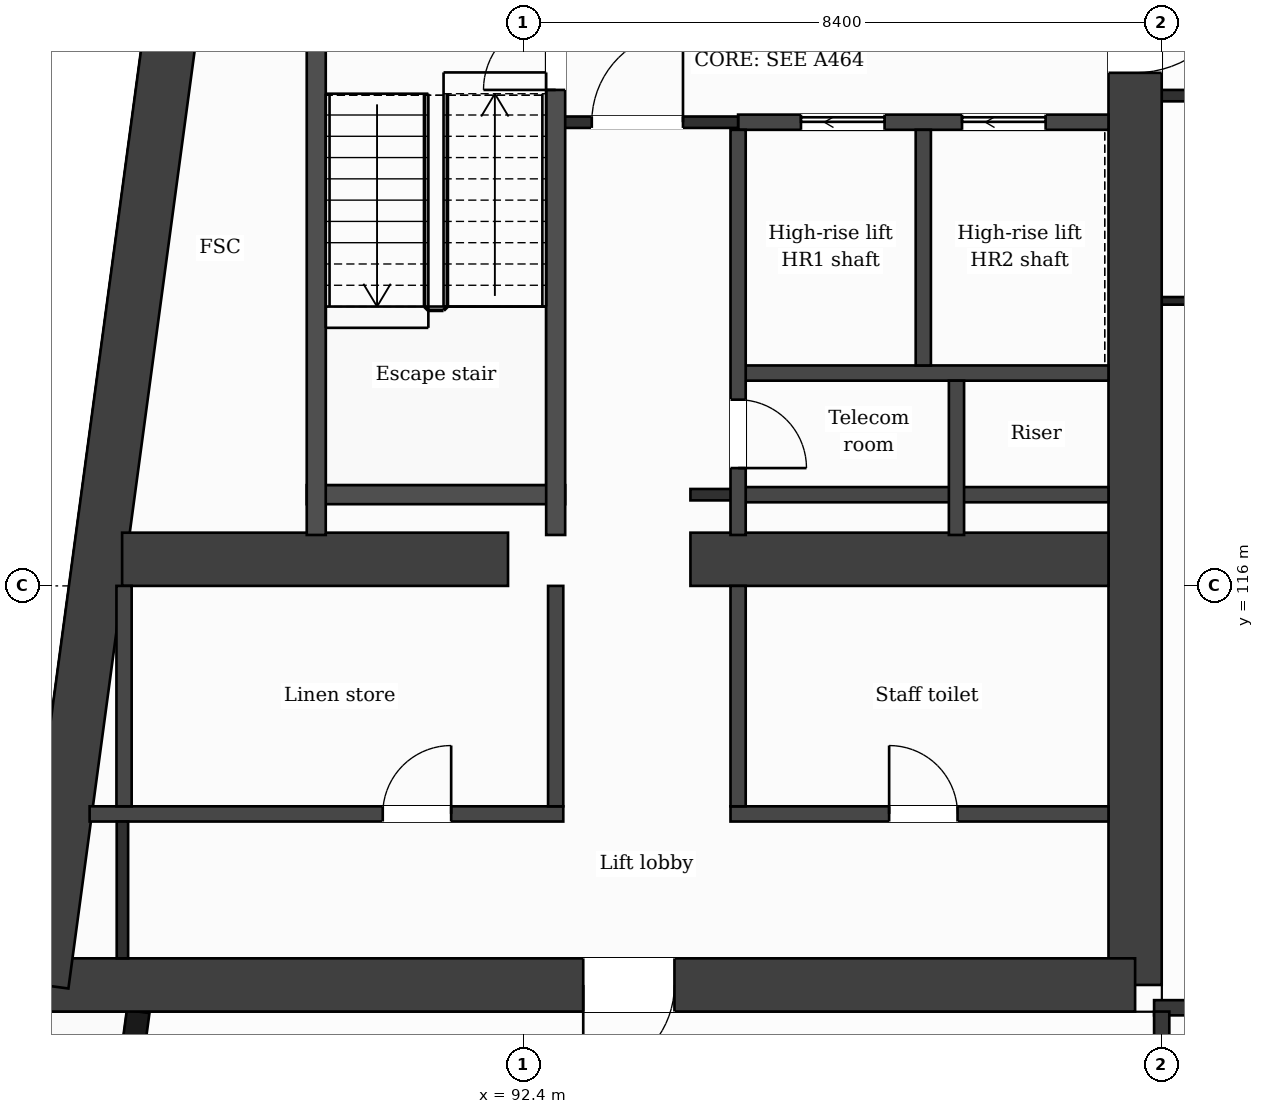
"""IFC4 building model, lengths in metres.
Left out: names, types, materials, properties, quantities, classifications, styles, units other than length and angle.
Written with IfcOpenShell. Run it as: python <this file> out.ifc"""

import sys

from ifc_helpers import new_model, si_unit, direction, frame, frame_2d, origin, place, context, subcontext, project, spatial, rectangle, extrude, element, fill, save


model = new_model("IFC4")
c1 = context("Model", 3, precision=1e-05, world=origin(), true_north=direction((0.0, 1.0)))
c2 = subcontext(c1, "Body", "Model", "MODEL_VIEW")
j1 = project(units=[si_unit("LENGTHUNIT", "METRE"), si_unit("PLANEANGLEUNIT", "RADIAN")], contexts=[c1])
p1 = place(None, origin())
s1 = spatial("IfcSite", under=j1, at=p1, CompositionType="ELEMENT")
p2 = place(p1, origin())
s2 = spatial("IfcBuilding", under=s1, at=p2, CompositionType="ELEMENT")
p3 = place(p2, frame((0.0, 0.0, 262.7)))
s3 = spatial("IfcBuildingStorey", under=s2, at=p3, CompositionType="ELEMENT", Elevation=262.7)
p4 = place(p3, frame((100.45, 132.05, 0.0), z_axis=(0.0, 0.0, 1.0), x_axis=(0.0, -1.0, 0.0)))
e1 = element("IfcWall", 1, at=p4, inside=s3, PredefinedType="SHEAR", context=c2, shape_type="SweptSolid", body=[
    extrude(rectangle(XDim=21.3, YDim=0.7, at=frame_2d((10.65, 0.0))), origin(), (0.0, 0.0, 1.0), 3.7),
])
p5 = place(p4, frame((7.9, 0.0, 0.0)))
e2 = element("IfcOpeningElement", 2, at=p5, cuts=e1, PredefinedType="OPENING", context=c2, shape_type="SweptSolid", body=[
    extrude(rectangle(XDim=1.4, YDim=2.1, at=frame_2d((0.7, 1.05))), frame((0.0, 0.36, 0.0), z_axis=(0.0, -1.0, 0.0), x_axis=(1.0, 0.0, 0.0)), (0.0, 0.0, 1.0), 0.72),
])
p6 = place(p3, frame((100.45, 110.75, 0.0), z_axis=(0.0, 0.0, 1.0), x_axis=(-1.0, 0.0, 0.0)))
e3 = element("IfcWall", 3, at=p6, inside=s3, PredefinedType="SHEAR", context=c2, shape_type="SweptSolid", body=[
    extrude(rectangle(XDim=14.38, YDim=0.7, at=frame_2d((7.19, 0.0))), origin(), (0.0, 0.0, 1.0), 3.7),
])
p7 = place(p6, frame((6.06, 0.0, 0.0)))
e4 = element("IfcOpeningElement", 4, at=p7, cuts=e3, PredefinedType="OPENING", context=c2, shape_type="SweptSolid", body=[
    extrude(rectangle(XDim=1.2, YDim=2.1, at=frame_2d((0.6, 1.05))), frame((0.0, 0.36, 0.0), z_axis=(0.0, -1.0, 0.0), x_axis=(1.0, 0.0, 0.0)), (0.0, 0.0, 1.0), 0.72),
])
p8 = place(p3, frame((86.07, 110.75, 0.0), z_axis=(0.0, 0.0, 1.0), x_axis=(0.133406218907, 0.991061441464, 0.0)))
e5 = element("IfcWall", 5, at=p8, inside=s3, PredefinedType="SHEAR", context=c2, shape_type="SweptSolid", body=[
    extrude(rectangle(XDim=21.492, YDim=0.7, at=frame_2d((10.746, 0.0))), origin(), (0.0, 0.0, 1.0), 3.7),
])
p9 = place(p3, frame((87.123, 116.35, 0.0), z_axis=(0.0, 0.0, 1.0), x_axis=(1.0, 0.0, 0.0)))
e6 = element("IfcWall", 6, at=p9, inside=s3, PredefinedType="SHEAR", context=c2, shape_type="SweptSolid", body=[
    extrude(rectangle(XDim=5.077, YDim=0.7, at=frame_2d((2.539, 0.0))), origin(), (0.0, 0.0, 1.0), 3.7),
])
p10 = place(p3, frame((94.6, 116.35, 0.0), z_axis=(0.0, 0.0, 1.0), x_axis=(1.0, 0.0, 0.0)))
e7 = element("IfcWall", 7, at=p10, inside=s3, PredefinedType="SHEAR", context=c2, shape_type="SweptSolid", body=[
    extrude(rectangle(XDim=5.5, YDim=0.7, at=frame_2d((2.75, 0.0))), origin(), (0.0, 0.0, 1.0), 3.7),
])
p11 = place(p3, frame((87.334, 110.4, 0.0), z_axis=(0.0, 0.0, 1.0), x_axis=(-0.13345962011, -0.991054251694, 0.0)))
e8 = element("IfcWall", 8, at=p11, inside=s3, PredefinedType="SOLIDWALL", context=c2, shape_type="SweptSolid", body=[
    extrude(rectangle(XDim=1.937, YDim=0.3, at=frame_2d((0.969, 0.0))), origin(), (0.0, 0.0, 1.0), 3.38),
])
p12 = place(p3, frame((100.7, 110.45, 0.0), z_axis=(0.0, 0.0, 1.0), x_axis=(1.0, 0.0, 0.0)))
e9 = element("IfcWall", 9, at=p12, inside=s3, PredefinedType="PARTITIONING", context=c2, shape_type="SweptSolid", body=[
    extrude(rectangle(XDim=25.4, YDim=0.2, at=frame_2d((12.7, 0.0))), origin(), (0.0, 0.0, 1.0), 3.38),
])
p13 = place(p3, frame((86.696, 113.0, 0.0), z_axis=(0.0, 0.0, 1.0), x_axis=(1.0, 0.0, 0.0)))
e10 = element("IfcWall", 10, at=p13, inside=s3, PredefinedType="PARTITIONING", context=c2, shape_type="SweptSolid", body=[
    extrude(rectangle(XDim=6.231, YDim=0.2, at=frame_2d((3.116, 0.0))), origin(), (0.0, 0.0, 1.0), 3.38),
])
p14 = place(p13, frame((3.856, 0.0, 0.0)))
e11 = element("IfcOpeningElement", 11, at=p14, cuts=e10, PredefinedType="OPENING", context=c2, shape_type="SweptSolid", body=[
    extrude(rectangle(XDim=0.9, YDim=2.1, at=frame_2d((0.45, 1.05))), frame((0.0, 0.11, 0.0), z_axis=(0.0, -1.0, 0.0), x_axis=(1.0, 0.0, 0.0)), (0.0, 0.0, 1.0), 0.22),
])
p15 = place(p3, frame((95.127, 113.0, 0.0), z_axis=(0.0, 0.0, 1.0), x_axis=(1.0, 0.0, 0.0)))
e12 = element("IfcWall", 12, at=p15, inside=s3, PredefinedType="PARTITIONING", context=c2, shape_type="SweptSolid", body=[
    extrude(rectangle(XDim=4.973, YDim=0.2, at=frame_2d((2.487, 0.0))), origin(), (0.0, 0.0, 1.0), 3.38),
])
p16 = place(p15, frame((2.087, 0.0, 0.0)))
e13 = element("IfcOpeningElement", 13, at=p16, cuts=e12, PredefinedType="OPENING", context=c2, shape_type="SweptSolid", body=[
    extrude(rectangle(XDim=0.9, YDim=2.1, at=frame_2d((0.45, 1.05))), frame((0.0, 0.11, 0.0), z_axis=(0.0, -1.0, 0.0), x_axis=(1.0, 0.0, 0.0)), (0.0, 0.0, 1.0), 0.22),
])
p17 = place(p3, frame((95.227, 117.2, 0.0), z_axis=(0.0, 0.0, 1.0), x_axis=(1.0, 0.0, 0.0)))
e14 = element("IfcWall", 14, at=p17, inside=s3, PredefinedType="PARTITIONING", context=c2, shape_type="SweptSolid", body=[
    extrude(rectangle(XDim=4.873, YDim=0.2, at=frame_2d((2.437, 0.0))), origin(), (0.0, 0.0, 1.0), 3.38),
])
p18 = place(p3, frame((94.6, 117.2, 0.0), z_axis=(0.0, 0.0, 1.0), x_axis=(1.0, 0.0, 0.0)))
e15 = element("IfcWall", 15, at=p18, inside=s3, PredefinedType="PARTITIONING", context=c2, shape_type="SweptSolid", body=[
    extrude(rectangle(XDim=0.627, YDim=0.15, at=frame_2d((0.313, 0.0))), origin(), (0.0, 0.0, 1.0), 3.38),
])
p19 = place(p3, frame((89.552, 117.2, 0.0), z_axis=(0.0, 0.0, 1.0), x_axis=(1.0, 0.0, 0.0)))
e16 = element("IfcWall", 16, at=p19, inside=s3, PredefinedType="PARTITIONING", context=c2, shape_type="SweptSolid", body=[
    extrude(rectangle(XDim=3.4, YDim=0.25, at=frame_2d((1.7, 0.0))), origin(), (0.0, 0.0, 1.0), 3.38),
])
p20 = place(p3, frame((95.227, 118.8, 0.0), z_axis=(0.0, 0.0, 1.0), x_axis=(1.0, 0.0, 0.0)))
e17 = element("IfcWall", 17, at=p20, inside=s3, PredefinedType="PARTITIONING", context=c2, shape_type="SweptSolid", body=[
    extrude(rectangle(XDim=4.873, YDim=0.2, at=frame_2d((2.437, 0.0))), origin(), (0.0, 0.0, 1.0), 3.38),
])
p21 = place(p3, frame((100.8, 119.75, 0.0), z_axis=(0.0, 0.0, 1.0), x_axis=(1.0, 0.0, 0.0)))
e18 = element("IfcWall", 18, at=p21, inside=s3, PredefinedType="PARTITIONING", context=c2, shape_type="SweptSolid", body=[
    extrude(rectangle(XDim=1.85, YDim=0.1, at=frame_2d((0.925, 0.0))), origin(), (0.0, 0.0, 1.0), 3.38),
])
p22 = place(p3, frame((95.227, 122.1, 0.0), z_axis=(0.0, 0.0, 1.0), x_axis=(1.0, 0.0, 0.0)))
e19 = element("IfcWall", 19, at=p22, inside=s3, PredefinedType="PARTITIONING", context=c2, shape_type="SweptSolid", body=[
    extrude(rectangle(XDim=4.873, YDim=0.2, at=frame_2d((2.437, 0.0))), origin(), (0.0, 0.0, 1.0), 3.38),
])
p23 = place(p22, frame((0.827, 0.0, 0.0)))
e20 = element("IfcOpeningElement", 20, at=p23, cuts=e19, PredefinedType="OPENING", context=c2, shape_type="SweptSolid", body=[
    extrude(rectangle(XDim=1.1, YDim=2.1, at=frame_2d((0.55, 1.05))), frame((0.0, 0.11, 0.0), z_axis=(0.0, -1.0, 0.0), x_axis=(1.0, 0.0, 0.0)), (0.0, 0.0, 1.0), 0.22),
])
p24 = place(p22, frame((2.946, 0.0, 0.0)))
e21 = element("IfcOpeningElement", 21, at=p24, cuts=e19, PredefinedType="OPENING", context=c2, shape_type="SweptSolid", body=[
    extrude(rectangle(XDim=1.1, YDim=2.1, at=frame_2d((0.55, 1.05))), frame((0.0, 0.11, 0.0), z_axis=(0.0, -1.0, 0.0), x_axis=(1.0, 0.0, 0.0)), (0.0, 0.0, 1.0), 0.22),
])
p25 = place(p3, frame((92.827, 122.1, 0.0), z_axis=(0.0, 0.0, 1.0), x_axis=(1.0, 0.0, 0.0)))
e22 = element("IfcWall", 22, at=p25, inside=s3, PredefinedType="PARTITIONING", context=c2, shape_type="SweptSolid", body=[
    extrude(rectangle(XDim=2.4, YDim=0.15, at=frame_2d((1.2, 0.0))), origin(), (0.0, 0.0, 1.0), 3.38),
])
p26 = place(p25, frame((0.475, 0.0, 0.0)))
e23 = element("IfcOpeningElement", 23, at=p26, cuts=e22, PredefinedType="OPENING", context=c2, shape_type="SweptSolid", body=[
    extrude(rectangle(XDim=1.2, YDim=2.1, at=frame_2d((0.6, 1.05))), frame((0.0, 0.085, 0.0), z_axis=(0.0, -1.0, 0.0), x_axis=(1.0, 0.0, 0.0)), (0.0, 0.0, 1.0), 0.17),
])
p27 = place(p3, frame((100.8, 122.45, 0.0), z_axis=(0.0, 0.0, 1.0), x_axis=(1.0, 0.0, 0.0)))
e24 = element("IfcWall", 24, at=p27, inside=s3, PredefinedType="PARTITIONING", context=c2, shape_type="SweptSolid", body=[
    extrude(rectangle(XDim=25.2, YDim=0.15, at=frame_2d((12.6, 0.0))), origin(), (0.0, 0.0, 1.0), 3.38),
])
p28 = place(p27, frame((5.55, 0.0, 0.0)))
e25 = element("IfcOpeningElement", 25, at=p28, cuts=e24, PredefinedType="OPENING", context=c2, shape_type="SweptSolid", body=[
    extrude(rectangle(XDim=1.0, YDim=2.1, at=frame_2d((0.5, 1.05))), frame((0.0, 0.085, 0.0), z_axis=(0.0, -1.0, 0.0), x_axis=(1.0, 0.0, 0.0)), (0.0, 0.0, 1.0), 0.17),
])
p29 = place(p27, frame((8.65, 0.0, 0.0)))
e26 = element("IfcOpeningElement", 26, at=p29, cuts=e24, PredefinedType="OPENING", context=c2, shape_type="SweptSolid", body=[
    extrude(rectangle(XDim=1.0, YDim=2.1, at=frame_2d((0.5, 1.05))), frame((0.0, 0.085, 0.0), z_axis=(0.0, -1.0, 0.0), x_axis=(1.0, 0.0, 0.0)), (0.0, 0.0, 1.0), 0.17),
])
p30 = place(p27, frame((19.83, 0.0, 0.0)))
e27 = element("IfcOpeningElement", 27, at=p30, cuts=e24, PredefinedType="OPENING", context=c2, shape_type="SweptSolid", body=[
    extrude(rectangle(XDim=1.0, YDim=2.1, at=frame_2d((0.5, 1.05))), frame((0.0, 0.085, 0.0), z_axis=(0.0, -1.0, 0.0), x_axis=(1.0, 0.0, 0.0)), (0.0, 0.0, 1.0), 0.17),
])
p31 = place(p3, frame((87.148, 113.1, 0.0), z_axis=(0.0, 0.0, 1.0), x_axis=(0.0, 1.0, 0.0)))
e28 = element("IfcWall", 28, at=p31, inside=s3, PredefinedType="PARTITIONING", context=c2, shape_type="SweptSolid", body=[
    extrude(rectangle(XDim=2.9, YDim=0.2, at=frame_2d((1.45, 0.0))), origin(), (0.0, 0.0, 1.0), 3.38),
])
p32 = place(p3, frame((87.127, 111.1, 0.0), z_axis=(0.0, 0.0, 1.0), x_axis=(0.0, 1.0, 0.0)))
e29 = element("IfcWall", 29, at=p32, inside=s3, PredefinedType="PARTITIONING", context=c2, shape_type="SweptSolid", body=[
    extrude(rectangle(XDim=1.8, YDim=0.15, at=frame_2d((0.9, 0.0))), origin(), (0.0, 0.0, 1.0), 3.38),
])
p33 = place(p3, frame((89.677, 116.67, 0.0), z_axis=(0.0, 0.0, 1.0), x_axis=(0.0, 1.0, 0.0)))
e30 = element("IfcWall", 30, at=p33, inside=s3, PredefinedType="PARTITIONING", context=c2, shape_type="SweptSolid", body=[
    extrude(rectangle(XDim=7.155, YDim=0.25, at=frame_2d((3.578, 0.0))), origin(), (0.0, 0.0, 1.0), 3.38),
])
p34 = place(p3, frame((92.827, 113.1, 0.0), z_axis=(0.0, 0.0, 1.0), x_axis=(0.0, 1.0, 0.0)))
e31 = element("IfcWall", 31, at=p34, inside=s3, PredefinedType="PARTITIONING", context=c2, shape_type="SweptSolid", body=[
    extrude(rectangle(XDim=2.9, YDim=0.2, at=frame_2d((1.45, 0.0))), origin(), (0.0, 0.0, 1.0), 3.38),
])
p35 = place(p3, frame((92.827, 116.67, 0.0), z_axis=(0.0, 0.0, 1.0), x_axis=(0.0, 1.0, 0.0)))
e32 = element("IfcWall", 32, at=p35, inside=s3, PredefinedType="PARTITIONING", context=c2, shape_type="SweptSolid", body=[
    extrude(rectangle(XDim=7.155, YDim=0.25, at=frame_2d((3.578, 0.0))), origin(), (0.0, 0.0, 1.0), 3.38),
])
p36 = place(p35, frame((5.855, 0.0, 0.0)))
e33 = element("IfcOpeningElement", 33, at=p36, cuts=e32, PredefinedType="OPENING", context=c2, shape_type="SweptSolid", body=[
    extrude(rectangle(XDim=0.95, YDim=2.1, at=frame_2d((0.475, 1.05))), frame((0.0, 0.135, 0.0), z_axis=(0.0, -1.0, 0.0), x_axis=(1.0, 0.0, 0.0)), (0.0, 0.0, 1.0), 0.27),
])
p37 = place(p3, frame((95.227, 113.1, 0.0), z_axis=(0.0, 0.0, 1.0), x_axis=(0.0, 1.0, 0.0)))
e34 = element("IfcWall", 34, at=p37, inside=s3, PredefinedType="PARTITIONING", context=c2, shape_type="SweptSolid", body=[
    extrude(rectangle(XDim=2.9, YDim=0.2, at=frame_2d((1.45, 0.0))), origin(), (0.0, 0.0, 1.0), 3.38),
])
p38 = place(p3, frame((95.227, 116.67, 0.0), z_axis=(0.0, 0.0, 1.0), x_axis=(0.0, 1.0, 0.0)))
e35 = element("IfcWall", 35, at=p38, inside=s3, PredefinedType="PARTITIONING", context=c2, shape_type="SweptSolid", body=[
    extrude(rectangle(XDim=5.33, YDim=0.2, at=frame_2d((2.665, 0.0))), origin(), (0.0, 0.0, 1.0), 3.38),
])
p39 = place(p38, frame((0.88, 0.0, 0.0)))
e36 = element("IfcOpeningElement", 36, at=p39, cuts=e35, PredefinedType="OPENING", context=c2, shape_type="SweptSolid", body=[
    extrude(rectangle(XDim=0.9, YDim=2.1, at=frame_2d((0.45, 1.05))), frame((0.0, 0.11, 0.0), z_axis=(0.0, -1.0, 0.0), x_axis=(1.0, 0.0, 0.0)), (0.0, 0.0, 1.0), 0.22),
])
p40 = place(p3, frame((97.664, 118.9, 0.0), z_axis=(0.0, 0.0, 1.0), x_axis=(0.0, 1.0, 0.0)))
e37 = element("IfcWall", 37, at=p40, inside=s3, PredefinedType="PARTITIONING", context=c2, shape_type="SweptSolid", body=[
    extrude(rectangle(XDim=3.1, YDim=0.2, at=frame_2d((1.55, 0.0))), origin(), (0.0, 0.0, 1.0), 3.38),
])
p41 = place(p3, frame((98.1, 116.67, 0.0), z_axis=(0.0, 0.0, 1.0), x_axis=(0.0, 1.0, 0.0)))
e38 = element("IfcWall", 38, at=p41, inside=s3, PredefinedType="PARTITIONING", context=c2, shape_type="SweptSolid", body=[
    extrude(rectangle(XDim=2.03, YDim=0.2, at=frame_2d((1.015, 0.0))), origin(), (0.0, 0.0, 1.0), 3.38),
])
p42 = place(p3, frame((100.8, 108.79, 0.0), z_axis=(0.0, 0.0, 1.0), x_axis=(0.0, 1.0, 0.0)))
e39 = element("IfcWall", 39, at=p42, inside=s3, PredefinedType="PARTITIONING", context=c2, shape_type="SweptSolid", body=[
    extrude(rectangle(XDim=1.61, YDim=0.2, at=frame_2d((0.805, 0.0))), origin(), (0.0, 0.0, 1.0), 3.38),
])
p43 = place(p26, origin())
e40 = element("IfcDoor", 40, at=p43, inside=s3, OperationType="SINGLE_SWING_RIGHT", PredefinedType="DOOR", context=c2, shape_type="SweptSolid", body=[
    extrude(rectangle(XDim=1.2, YDim=2.1, at=frame_2d((0.6, 1.05))), frame((0.0, 0.025, 0.0), z_axis=(0.0, -1.0, 0.0), x_axis=(1.0, 0.0, 0.0)), (0.0, 0.0, 1.0), 0.05),
])
fill(e23, e40)
p44 = place(p23, origin())
e41 = element("IfcDoor", 41, at=p44, inside=s3, OperationType="SLIDING_TO_LEFT", PredefinedType="DOOR", context=c2, shape_type="SweptSolid", body=[
    extrude(rectangle(XDim=1.1, YDim=2.1, at=frame_2d((0.55, 1.05))), frame((0.0, 0.025, 0.0), z_axis=(0.0, -1.0, 0.0), x_axis=(1.0, 0.0, 0.0)), (0.0, 0.0, 1.0), 0.05),
])
fill(e20, e41)
p45 = place(p24, origin())
e42 = element("IfcDoor", 42, at=p45, inside=s3, OperationType="SLIDING_TO_LEFT", PredefinedType="DOOR", context=c2, shape_type="SweptSolid", body=[
    extrude(rectangle(XDim=1.1, YDim=2.1, at=frame_2d((0.55, 1.05))), frame((0.0, 0.025, 0.0), z_axis=(0.0, -1.0, 0.0), x_axis=(1.0, 0.0, 0.0)), (0.0, 0.0, 1.0), 0.05),
])
fill(e21, e42)
p46 = place(p36, origin())
e43 = element("IfcDoor", 43, at=p46, inside=s3, OperationType="SINGLE_SWING_LEFT", PredefinedType="DOOR", context=c2, shape_type="SweptSolid", body=[
    extrude(rectangle(XDim=0.95, YDim=2.1, at=frame_2d((0.475, 1.05))), frame((0.0, 0.025, 0.0), z_axis=(0.0, -1.0, 0.0), x_axis=(1.0, 0.0, 0.0)), (0.0, 0.0, 1.0), 0.05),
])
fill(e33, e43)
p47 = place(p39, origin())
e44 = element("IfcDoor", 44, at=p47, inside=s3, OperationType="SINGLE_SWING_LEFT", PredefinedType="DOOR", context=c2, shape_type="SweptSolid", body=[
    extrude(rectangle(XDim=0.9, YDim=2.1, at=frame_2d((0.45, 1.05))), frame((0.0, 0.025, 0.0), z_axis=(0.0, -1.0, 0.0), x_axis=(1.0, 0.0, 0.0)), (0.0, 0.0, 1.0), 0.05),
])
fill(e36, e44)
p48 = place(p14, origin())
e45 = element("IfcDoor", 45, at=p48, inside=s3, OperationType="SINGLE_SWING_RIGHT", PredefinedType="DOOR", context=c2, shape_type="SweptSolid", body=[
    extrude(rectangle(XDim=0.9, YDim=2.1, at=frame_2d((0.45, 1.05))), frame((0.0, 0.025, 0.0), z_axis=(0.0, -1.0, 0.0), x_axis=(1.0, 0.0, 0.0)), (0.0, 0.0, 1.0), 0.05),
])
fill(e11, e45)
p49 = place(p16, origin())
e46 = element("IfcDoor", 46, at=p49, inside=s3, OperationType="SINGLE_SWING_LEFT", PredefinedType="DOOR", context=c2, shape_type="SweptSolid", body=[
    extrude(rectangle(XDim=0.9, YDim=2.1, at=frame_2d((0.45, 1.05))), frame((0.0, 0.025, 0.0), z_axis=(0.0, -1.0, 0.0), x_axis=(1.0, 0.0, 0.0)), (0.0, 0.0, 1.0), 0.05),
])
fill(e13, e46)
p50 = place(p7, origin())
e47 = element("IfcDoor", 47, at=p50, inside=s3, OperationType="SINGLE_SWING_RIGHT", PredefinedType="DOOR", context=c2, shape_type="SweptSolid", body=[
    extrude(rectangle(XDim=1.2, YDim=2.1, at=frame_2d((0.6, 1.05))), frame((0.0, 0.025, 0.0), z_axis=(0.0, -1.0, 0.0), x_axis=(1.0, 0.0, 0.0)), (0.0, 0.0, 1.0), 0.05),
])
fill(e4, e47)
p51 = place(p5, origin())
e48 = element("IfcDoor", 48, at=p51, inside=s3, OperationType="SINGLE_SWING_LEFT", PredefinedType="DOOR", context=c2, shape_type="SweptSolid", body=[
    extrude(rectangle(XDim=1.4, YDim=2.1, at=frame_2d((0.7, 1.05))), frame((0.0, 0.025, 0.0), z_axis=(0.0, -1.0, 0.0), x_axis=(1.0, 0.0, 0.0)), (0.0, 0.0, 1.0), 0.05),
])
fill(e2, e48)
save(model, sys.argv[1])
